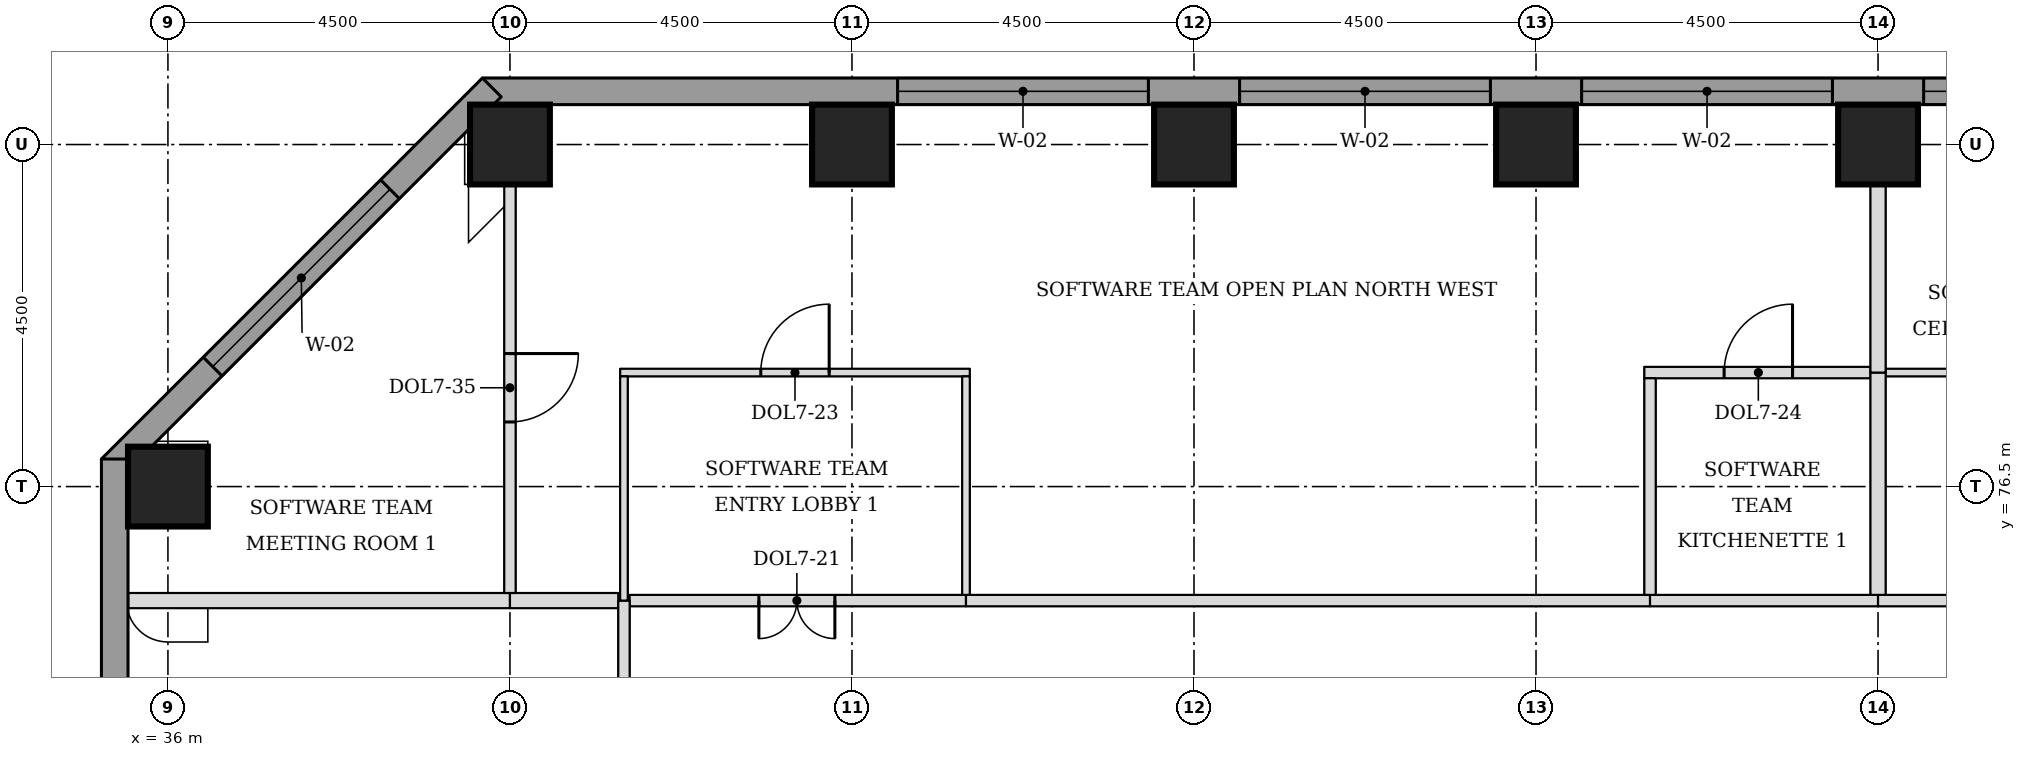
"""IFC4 building model, lengths in metres.
Left out: names, types, materials, properties, quantities, classifications, styles, units other than length and angle.
Written with IfcOpenShell. Run it as: python <this file> out.ifc"""

import sys

from ifc_helpers import new_model, si_unit, direction, frame, frame_2d, origin, origin_2d, place, context, subcontext, project, spatial, rectangle, extrude, element, fill, save


model = new_model("IFC4")
c1 = context("Model", 3, precision=1e-05, world=origin(), true_north=direction((0.0, 1.0)))
c2 = subcontext(c1, "Body", "Model", "MODEL_VIEW")
j1 = project(units=[si_unit("LENGTHUNIT", "METRE"), si_unit("PLANEANGLEUNIT", "RADIAN")], contexts=[c1])
p1 = place(None, origin())
s1 = spatial("IfcSite", under=j1, at=p1, CompositionType="ELEMENT")
p2 = place(p1, origin())
s2 = spatial("IfcBuilding", under=s1, at=p2, CompositionType="ELEMENT")
p3 = place(p2, frame((0.0, 0.0, 134.4)))
s3 = spatial("IfcBuildingStorey", under=s2, at=p3, CompositionType="ELEMENT", Elevation=134.4)
for number, where, z_axis, x_axis in (
    (1, (36.0, 76.5, 0.0), (0.0, 0.0, 1.0), (1.0, 0.0, 0.0)),
    (2, (40.5, 81.0, 0.0), (0.0, 0.0, 1.0), (1.0, 0.0, 0.0)),
    (3, (45.0, 81.0, 0.0), (0.0, 0.0, 1.0), (1.0, 0.0, 0.0)),
    (4, (49.5, 81.0, 0.0), (0.0, 0.0, 1.0), (1.0, 0.0, 0.0)),
    (5, (54.0, 81.0, 0.0), (0.0, 0.0, 1.0), (1.0, 0.0, 0.0)),
    (6, (58.5, 81.0, 0.0), (0.0, 0.0, 1.0), (1.0, 0.0, 0.0)),
):
    element("IfcColumn", number, at=place(p3, frame(where, z_axis=z_axis, x_axis=x_axis)), inside=s3, PredefinedType="COLUMN", context=c2, shape_type="SweptSolid", body=[
        extrude(rectangle(XDim=1.05, YDim=1.05, at=origin_2d()), origin(), (0.0, 0.0, 1.0), 3.7),
    ])
p4 = place(p3, frame((72.362, 81.7, 0.0), z_axis=(0.0, 0.0, 1.0), x_axis=(-1.0, 0.0, 0.0)))
e7 = element("IfcWall", 7, at=p4, inside=s3, PredefinedType="STANDARD", context=c2, shape_type="SweptSolid", body=[
    extrude(rectangle(XDim=32.225, YDim=0.35, at=frame_2d((16.112, 0.0))), origin(), (0.0, 0.0, 1.0), 3.525),
])
p5 = place(p4, frame((5.462, 0.0, 0.9)))
e8 = element("IfcOpeningElement", 8, at=p5, cuts=e7, PredefinedType="OPENING", context=c2, shape_type="SweptSolid", body=[
    extrude(rectangle(XDim=3.3, YDim=1.9, at=frame_2d((1.65, 0.95))), frame((0.0, 0.185, 0.0), z_axis=(0.0, -1.0, 0.0), x_axis=(1.0, 0.0, 0.0)), (0.0, 0.0, 1.0), 0.37),
])
p6 = place(p4, frame((9.962, 0.0, 0.9)))
e9 = element("IfcOpeningElement", 9, at=p6, cuts=e7, PredefinedType="OPENING", context=c2, shape_type="SweptSolid", body=[
    extrude(rectangle(XDim=3.3, YDim=1.9, at=frame_2d((1.65, 0.95))), frame((0.0, 0.185, 0.0), z_axis=(0.0, -1.0, 0.0), x_axis=(1.0, 0.0, 0.0)), (0.0, 0.0, 1.0), 0.37),
])
p7 = place(p4, frame((14.462, 0.0, 0.9)))
e10 = element("IfcOpeningElement", 10, at=p7, cuts=e7, PredefinedType="OPENING", context=c2, shape_type="SweptSolid", body=[
    extrude(rectangle(XDim=3.3, YDim=1.9, at=frame_2d((1.65, 0.95))), frame((0.0, 0.185, 0.0), z_axis=(0.0, -1.0, 0.0), x_axis=(1.0, 0.0, 0.0)), (0.0, 0.0, 1.0), 0.37),
])
p8 = place(p4, frame((18.962, 0.0, 0.9)))
e11 = element("IfcOpeningElement", 11, at=p8, cuts=e7, PredefinedType="OPENING", context=c2, shape_type="SweptSolid", body=[
    extrude(rectangle(XDim=3.3, YDim=1.9, at=frame_2d((1.65, 0.95))), frame((0.0, 0.185, 0.0), z_axis=(0.0, -1.0, 0.0), x_axis=(1.0, 0.0, 0.0)), (0.0, 0.0, 1.0), 0.37),
])
p9 = place(p4, frame((23.462, 0.0, 0.9)))
e12 = element("IfcOpeningElement", 12, at=p9, cuts=e7, PredefinedType="OPENING", context=c2, shape_type="SweptSolid", body=[
    extrude(rectangle(XDim=3.3, YDim=1.9, at=frame_2d((1.65, 0.95))), frame((0.0, 0.185, 0.0), z_axis=(0.0, -1.0, 0.0), x_axis=(1.0, 0.0, 0.0)), (0.0, 0.0, 1.0), 0.37),
])
p10 = place(p3, frame((40.261, 81.751, 0.0), z_axis=(0.0, 0.0, 1.0), x_axis=(-0.707106781187, -0.707106781187, 0.0)))
e13 = element("IfcWall", 13, at=p10, inside=s3, PredefinedType="STANDARD", context=c2, shape_type="SweptSolid", body=[
    extrude(rectangle(XDim=7.089, YDim=0.35, at=frame_2d((3.544, 0.0))), origin(), (0.0, 0.0, 1.0), 3.525),
])
p11 = place(p10, frame((1.894, 0.0, 0.9)))
e14 = element("IfcOpeningElement", 14, at=p11, cuts=e13, PredefinedType="OPENING", context=c2, shape_type="SweptSolid", body=[
    extrude(rectangle(XDim=3.3, YDim=1.9, at=frame_2d((1.65, 0.95))), frame((0.0, 0.185, 0.0), z_axis=(0.0, -1.0, 0.0), x_axis=(1.0, 0.0, 0.0)), (0.0, 0.0, 1.0), 0.37),
])
p12 = place(p3, frame((35.3, 76.862, 0.0), z_axis=(0.0, 0.0, 1.0), x_axis=(0.0, -1.0, 0.0)))
e15 = element("IfcWall", 15, at=p12, inside=s3, PredefinedType="STANDARD", context=c2, shape_type="SweptSolid", body=[
    extrude(rectangle(XDim=13.337, YDim=0.35, at=frame_2d((6.669, 0.0))), origin(), (0.0, 0.0, 1.0), 3.525),
])
p13 = place(p12, frame((9.537, 0.0, 0.9)))
e16 = element("IfcOpeningElement", 16, at=p13, cuts=e15, PredefinedType="OPENING", context=c2, shape_type="SweptSolid", body=[
    extrude(rectangle(XDim=3.3, YDim=1.9, at=frame_2d((1.65, 0.95))), frame((0.0, 0.185, 0.0), z_axis=(0.0, -1.0, 0.0), x_axis=(1.0, 0.0, 0.0)), (0.0, 0.0, 1.0), 0.37),
])
p14 = place(p3, frame((35.475, 75.0, 0.0), z_axis=(0.0, 0.0, 1.0), x_axis=(1.0, 0.0, 0.0)))
e17 = element("IfcWall", 17, at=p14, inside=s3, PredefinedType="PARTITIONING", context=c2, shape_type="SweptSolid", body=[
    extrude(rectangle(XDim=5.025, YDim=0.2, at=frame_2d((2.512, 0.0))), origin(), (0.0, 0.0, 1.0), 3.55),
])
p15 = place(p3, frame((40.5, 75.0, 0.0), z_axis=(0.0, 0.0, 1.0), x_axis=(1.0, 0.0, 0.0)))
e18 = element("IfcWall", 18, at=p15, inside=s3, PredefinedType="PARTITIONING", context=c2, shape_type="SweptSolid", body=[
    extrude(rectangle(XDim=1.425, YDim=0.2, at=frame_2d((0.712, 0.0))), origin(), (0.0, 0.0, 1.0), 3.55),
])
p16 = place(p3, frame((42.075, 75.0, 0.0), z_axis=(0.0, 0.0, 1.0), x_axis=(1.0, 0.0, 0.0)))
e19 = element("IfcWall", 19, at=p16, inside=s3, PredefinedType="PARTITIONING", context=c2, shape_type="SweptSolid", body=[
    extrude(rectangle(XDim=4.425, YDim=0.15, at=frame_2d((2.212, 0.0))), origin(), (0.0, 0.0, 1.0), 3.55),
])
p17 = place(p16, frame((1.7, 0.0, 0.0)))
e20 = element("IfcOpeningElement", 20, at=p17, cuts=e19, PredefinedType="OPENING", context=c2, shape_type="SweptSolid", body=[
    extrude(rectangle(XDim=1.0, YDim=2.1, at=frame_2d((0.5, 1.05))), frame((0.0, 0.085, 0.0), z_axis=(0.0, -1.0, 0.0), x_axis=(1.0, 0.0, 0.0)), (0.0, 0.0, 1.0), 0.17),
])
p18 = place(p3, frame((46.5, 75.0, 0.0), z_axis=(0.0, 0.0, 1.0), x_axis=(1.0, 0.0, 0.0)))
e21 = element("IfcWall", 21, at=p18, inside=s3, PredefinedType="PARTITIONING", context=c2, shape_type="SweptSolid", body=[
    extrude(rectangle(XDim=9.0, YDim=0.15, at=frame_2d((4.5, 0.0))), origin(), (0.0, 0.0, 1.0), 3.55),
])
p19 = place(p3, frame((55.5, 75.0, 0.0), z_axis=(0.0, 0.0, 1.0), x_axis=(1.0, 0.0, 0.0)))
e22 = element("IfcWall", 22, at=p19, inside=s3, PredefinedType="PARTITIONING", context=c2, shape_type="SweptSolid", body=[
    extrude(rectangle(XDim=3.0, YDim=0.15, at=frame_2d((1.5, 0.0))), origin(), (0.0, 0.0, 1.0), 3.55),
])
p20 = place(p3, frame((58.5, 75.0, 0.0), z_axis=(0.0, 0.0, 1.0), x_axis=(1.0, 0.0, 0.0)))
e23 = element("IfcWall", 23, at=p20, inside=s3, PredefinedType="PARTITIONING", context=c2, shape_type="SweptSolid", body=[
    extrude(rectangle(XDim=12.0, YDim=0.15, at=frame_2d((6.0, 0.0))), origin(), (0.0, 0.0, 1.0), 3.55),
])
p21 = place(p20, frame((5.5, 0.0, 0.0)))
e24 = element("IfcOpeningElement", 24, at=p21, cuts=e23, PredefinedType="OPENING", context=c2, shape_type="SweptSolid", body=[
    extrude(rectangle(XDim=1.0, YDim=2.1, at=frame_2d((0.5, 1.05))), frame((0.0, 0.085, 0.0), z_axis=(0.0, -1.0, 0.0), x_axis=(1.0, 0.0, 0.0)), (0.0, 0.0, 1.0), 0.17),
])
p22 = place(p3, frame((41.95, 78.0, 0.0), z_axis=(0.0, 0.0, 1.0), x_axis=(1.0, 0.0, 0.0)))
e25 = element("IfcWall", 25, at=p22, inside=s3, PredefinedType="PARTITIONING", context=c2, shape_type="SweptSolid", body=[
    extrude(rectangle(XDim=4.6, YDim=0.1, at=frame_2d((2.3, 0.0))), origin(), (0.0, 0.0, 1.0), 3.55),
])
p23 = place(p22, frame((1.85, 0.0, 0.0)))
e26 = element("IfcOpeningElement", 26, at=p23, cuts=e25, PredefinedType="OPENING", context=c2, shape_type="SweptSolid", body=[
    extrude(rectangle(XDim=0.9, YDim=2.1, at=frame_2d((0.45, 1.05))), frame((0.0, 0.06, 0.0), z_axis=(0.0, -1.0, 0.0), x_axis=(1.0, 0.0, 0.0)), (0.0, 0.0, 1.0), 0.12),
])
p24 = place(p3, frame((55.425, 78.0, 0.0), z_axis=(0.0, 0.0, 1.0), x_axis=(1.0, 0.0, 0.0)))
e27 = element("IfcWall", 27, at=p24, inside=s3, PredefinedType="PARTITIONING", context=c2, shape_type="SweptSolid", body=[
    extrude(rectangle(XDim=2.975, YDim=0.15, at=frame_2d((1.487, 0.0))), origin(), (0.0, 0.0, 1.0), 3.55),
])
p25 = place(p24, frame((1.05, 0.0, 0.0)))
e28 = element("IfcOpeningElement", 28, at=p25, cuts=e27, PredefinedType="OPENING", context=c2, shape_type="SweptSolid", body=[
    extrude(rectangle(XDim=0.9, YDim=2.1, at=frame_2d((0.45, 1.05))), frame((0.0, 0.085, 0.0), z_axis=(0.0, -1.0, 0.0), x_axis=(1.0, 0.0, 0.0)), (0.0, 0.0, 1.0), 0.17),
])
p26 = place(p3, frame((58.6, 78.0, 0.0), z_axis=(0.0, 0.0, 1.0), x_axis=(1.0, 0.0, 0.0)))
e29 = element("IfcWall", 29, at=p26, inside=s3, PredefinedType="PARTITIONING", context=c2, shape_type="SweptSolid", body=[
    extrude(rectangle(XDim=4.45, YDim=0.1, at=frame_2d((2.225, 0.0))), origin(), (0.0, 0.0, 1.0), 3.55),
])
p27 = place(p3, frame((42.0, 57.075, 0.0), z_axis=(0.0, 0.0, 1.0), x_axis=(0.0, 1.0, 0.0)))
e30 = element("IfcWall", 30, at=p27, inside=s3, PredefinedType="PARTITIONING", context=c2, shape_type="SweptSolid", body=[
    extrude(rectangle(XDim=17.925, YDim=0.15, at=frame_2d((8.962, 0.0))), origin(), (0.0, 0.0, 1.0), 3.55),
])
p28 = place(p3, frame((42.0, 75.0, 0.0), z_axis=(0.0, 0.0, 1.0), x_axis=(0.0, 1.0, 0.0)))
e31 = element("IfcWall", 31, at=p28, inside=s3, PredefinedType="PARTITIONING", context=c2, shape_type="SweptSolid", body=[
    extrude(rectangle(XDim=2.95, YDim=0.1, at=frame_2d((1.475, 0.0))), origin(), (0.0, 0.0, 1.0), 3.55),
])
p29 = place(p3, frame((46.5, 75.075, 0.0), z_axis=(0.0, 0.0, 1.0), x_axis=(0.0, 1.0, 0.0)))
e32 = element("IfcWall", 32, at=p29, inside=s3, PredefinedType="PARTITIONING", context=c2, shape_type="SweptSolid", body=[
    extrude(rectangle(XDim=2.875, YDim=0.1, at=frame_2d((1.438, 0.0))), origin(), (0.0, 0.0, 1.0), 2.948),
])
p30 = place(p3, frame((55.5, 75.075, 0.0), z_axis=(0.0, 0.0, 1.0), x_axis=(0.0, 1.0, 0.0)))
e33 = element("IfcWall", 33, at=p30, inside=s3, PredefinedType="PARTITIONING", context=c2, shape_type="SweptSolid", body=[
    extrude(rectangle(XDim=2.85, YDim=0.15, at=frame_2d((1.425, 0.0))), origin(), (0.0, 0.0, 1.0), 3.55),
])
p31 = place(p3, frame((58.5, 75.075, 0.0), z_axis=(0.0, 0.0, 1.0), x_axis=(0.0, 1.0, 0.0)))
e34 = element("IfcWall", 34, at=p31, inside=s3, PredefinedType="PARTITIONING", context=c2, shape_type="SweptSolid", body=[
    extrude(rectangle(XDim=2.925, YDim=0.2, at=frame_2d((1.462, 0.0))), origin(), (0.0, 0.0, 1.0), 3.55),
])
p32 = place(p3, frame((40.5, 75.1, 0.0), z_axis=(0.0, 0.0, 1.0), x_axis=(0.0, 1.0, 0.0)))
e35 = element("IfcWall", 35, at=p32, inside=s3, PredefinedType="PARTITIONING", context=c2, shape_type="SweptSolid", body=[
    extrude(rectangle(XDim=5.375, YDim=0.15, at=frame_2d((2.688, 0.0))), origin(), (0.0, 0.0, 1.0), 3.55),
])
p33 = place(p32, frame((2.25, 0.0, 0.0)))
e36 = element("IfcOpeningElement", 36, at=p33, cuts=e35, PredefinedType="OPENING", context=c2, shape_type="SweptSolid", body=[
    extrude(rectangle(XDim=0.9, YDim=2.1, at=frame_2d((0.45, 1.05))), frame((0.0, 0.085, 0.0), z_axis=(0.0, -1.0, 0.0), x_axis=(1.0, 0.0, 0.0)), (0.0, 0.0, 1.0), 0.17),
])
p34 = place(p3, frame((58.5, 78.0, 0.0), z_axis=(0.0, 0.0, 1.0), x_axis=(0.0, 1.0, 0.0)))
e37 = element("IfcWall", 37, at=p34, inside=s3, PredefinedType="PARTITIONING", context=c2, shape_type="SweptSolid", body=[
    extrude(rectangle(XDim=3.525, YDim=0.2, at=frame_2d((1.762, 0.0))), origin(), (0.0, 0.0, 1.0), 3.55),
])
p35 = place(p6, origin())
e38 = element("IfcWindow", 38, at=p35, inside=s3, PartitioningType="SINGLE_PANEL", PredefinedType="WINDOW", context=c2, shape_type="SweptSolid", body=[
    extrude(rectangle(XDim=3.3, YDim=1.9, at=frame_2d((1.65, 0.95))), frame((0.0, 0.085, 0.0), z_axis=(0.0, -1.0, 0.0), x_axis=(1.0, 0.0, 0.0)), (0.0, 0.0, 1.0), 0.06),
])
fill(e9, e38)
p36 = place(p7, origin())
e39 = element("IfcWindow", 39, at=p36, inside=s3, PartitioningType="SINGLE_PANEL", PredefinedType="WINDOW", context=c2, shape_type="SweptSolid", body=[
    extrude(rectangle(XDim=3.3, YDim=1.9, at=frame_2d((1.65, 0.95))), frame((0.0, 0.085, 0.0), z_axis=(0.0, -1.0, 0.0), x_axis=(1.0, 0.0, 0.0)), (0.0, 0.0, 1.0), 0.06),
])
fill(e10, e39)
p37 = place(p8, origin())
e40 = element("IfcWindow", 40, at=p37, inside=s3, PartitioningType="SINGLE_PANEL", PredefinedType="WINDOW", context=c2, shape_type="SweptSolid", body=[
    extrude(rectangle(XDim=3.3, YDim=1.9, at=frame_2d((1.65, 0.95))), frame((0.0, 0.085, 0.0), z_axis=(0.0, -1.0, 0.0), x_axis=(1.0, 0.0, 0.0)), (0.0, 0.0, 1.0), 0.06),
])
fill(e11, e40)
p38 = place(p9, origin())
e41 = element("IfcWindow", 41, at=p38, inside=s3, PartitioningType="SINGLE_PANEL", PredefinedType="WINDOW", context=c2, shape_type="SweptSolid", body=[
    extrude(rectangle(XDim=3.3, YDim=1.9, at=frame_2d((1.65, 0.95))), frame((0.0, 0.085, 0.0), z_axis=(0.0, -1.0, 0.0), x_axis=(1.0, 0.0, 0.0)), (0.0, 0.0, 1.0), 0.06),
])
fill(e12, e41)
p39 = place(p11, origin())
e42 = element("IfcWindow", 42, at=p39, inside=s3, PartitioningType="SINGLE_PANEL", PredefinedType="WINDOW", context=c2, shape_type="SweptSolid", body=[
    extrude(rectangle(XDim=3.3, YDim=1.9, at=frame_2d((1.65, 0.95))), frame((0.0, 0.085, 0.0), z_axis=(0.0, -1.0, 0.0), x_axis=(1.0, 0.0, 0.0)), (0.0, 0.0, 1.0), 0.06),
])
fill(e14, e42)
p40 = place(p17, frame((1.0, 0.0, 0.0), z_axis=(0.0, 0.0, 1.0), x_axis=(-1.0, 0.0, 0.0)))
e43 = element("IfcDoor", 43, at=p40, inside=s3, OperationType="DOUBLE_DOOR_SINGLE_SWING", PredefinedType="DOOR", context=c2, shape_type="SweptSolid", body=[
    extrude(rectangle(XDim=1.0, YDim=2.1, at=frame_2d((0.5, 1.05))), frame((0.0, 0.025, 0.0), z_axis=(0.0, -1.0, 0.0), x_axis=(1.0, 0.0, 0.0)), (0.0, 0.0, 1.0), 0.05),
])
fill(e20, e43)
p41 = place(p23, origin())
e44 = element("IfcDoor", 44, at=p41, inside=s3, OperationType="SINGLE_SWING_RIGHT", PredefinedType="DOOR", context=c2, shape_type="SweptSolid", body=[
    extrude(rectangle(XDim=0.9, YDim=2.1, at=frame_2d((0.45, 1.05))), frame((0.0, 0.025, 0.0), z_axis=(0.0, -1.0, 0.0), x_axis=(1.0, 0.0, 0.0)), (0.0, 0.0, 1.0), 0.05),
])
fill(e26, e44)
p42 = place(p25, origin())
e45 = element("IfcDoor", 45, at=p42, inside=s3, OperationType="SINGLE_SWING_RIGHT", PredefinedType="DOOR", context=c2, shape_type="SweptSolid", body=[
    extrude(rectangle(XDim=0.9, YDim=2.1, at=frame_2d((0.45, 1.05))), frame((0.0, 0.025, 0.0), z_axis=(0.0, -1.0, 0.0), x_axis=(1.0, 0.0, 0.0)), (0.0, 0.0, 1.0), 0.05),
])
fill(e28, e45)
p43 = place(p33, frame((0.9, 0.0, 0.0), z_axis=(0.0, 0.0, 1.0), x_axis=(-1.0, 0.0, 0.0)))
e46 = element("IfcDoor", 46, at=p43, inside=s3, OperationType="SINGLE_SWING_LEFT", PredefinedType="DOOR", context=c2, shape_type="SweptSolid", body=[
    extrude(rectangle(XDim=0.9, YDim=2.1, at=frame_2d((0.45, 1.05))), frame((0.0, 0.025, 0.0), z_axis=(0.0, -1.0, 0.0), x_axis=(1.0, 0.0, 0.0)), (0.0, 0.0, 1.0), 0.05),
])
fill(e36, e46)
save(model, sys.argv[1])
